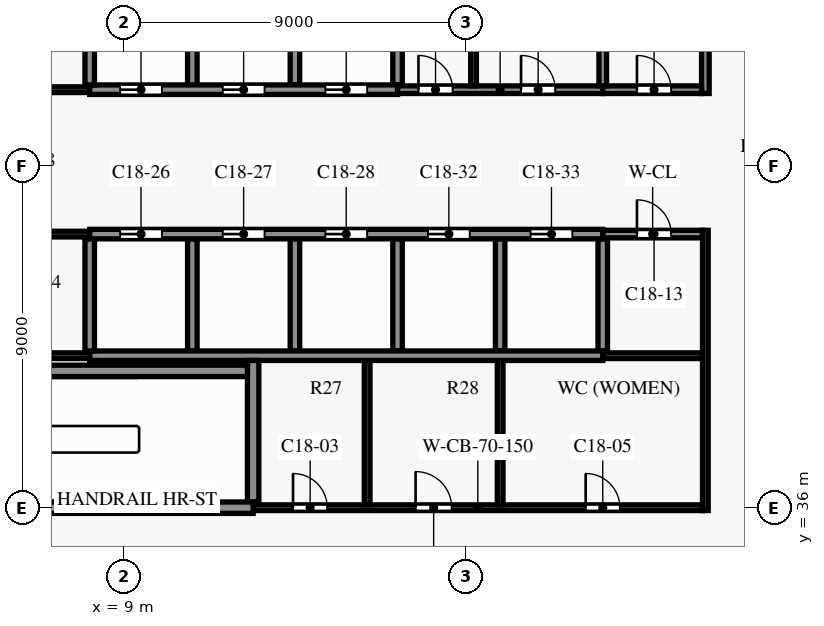
"""IFC4 building model, lengths in metres.
Left out: names, types, materials, properties, quantities, classifications, styles, units other than length and angle.
Written with IfcOpenShell. Run it as: python <this file> out.ifc"""

import sys

from ifc_helpers import new_model, si_unit, direction, frame, frame_2d, origin, place, context, subcontext, project, spatial, rectangle, extrude, element, fill, save


model = new_model("IFC4")
c1 = context("Model", 3, precision=1e-05, world=origin(), true_north=direction((0.0, 1.0)))
c2 = subcontext(c1, "Body", "Model", "MODEL_VIEW")
j1 = project(units=[si_unit("LENGTHUNIT", "METRE"), si_unit("PLANEANGLEUNIT", "RADIAN")], contexts=[c1])
p1 = place(None, origin())
s1 = spatial("IfcSite", under=j1, at=p1, CompositionType="ELEMENT")
p2 = place(p1, origin())
s2 = spatial("IfcBuilding", under=s1, at=p2, CompositionType="ELEMENT")
p3 = place(p2, frame((0.0, 0.0, 130.3)))
s3 = spatial("IfcBuildingStorey", under=s2, at=p3, CompositionType="ELEMENT", Elevation=130.3)
p4 = place(p3, frame((12.4, 36.0, 0.0), z_axis=(0.0, 0.0, 1.0), x_axis=(1.0, 0.0, 0.0)))
e1 = element("IfcWall", 1, at=p4, inside=s3, PredefinedType="SHEAR", context=c2, shape_type="SweptSolid", body=[
    extrude(rectangle(XDim=11.825, YDim=0.15, at=frame_2d((5.913, 0.0))), origin(), (0.0, 0.0, 1.0), 3.5),
])
p5 = place(p4, frame((1.05, 0.0, 0.0)))
e2 = element("IfcOpeningElement", 2, at=p5, cuts=e1, PredefinedType="OPENING", context=c2, shape_type="SweptSolid", body=[
    extrude(rectangle(XDim=0.9, YDim=2.1, at=frame_2d((0.45, 1.05))), frame((0.0, 0.085, 0.0), z_axis=(0.0, -1.0, 0.0), x_axis=(1.0, 0.0, 0.0)), (0.0, 0.0, 1.0), 0.17),
])
p6 = place(p4, frame((4.275, 0.0, 0.0)))
e3 = element("IfcOpeningElement", 3, at=p6, cuts=e1, PredefinedType="OPENING", context=c2, shape_type="SweptSolid", body=[
    extrude(rectangle(XDim=0.95, YDim=2.1, at=frame_2d((0.475, 1.05))), frame((0.0, 0.085, 0.0), z_axis=(0.0, -1.0, 0.0), x_axis=(1.0, 0.0, 0.0)), (0.0, 0.0, 1.0), 0.17),
])
p7 = place(p4, frame((8.75, 0.0, 0.0)))
e4 = element("IfcOpeningElement", 4, at=p7, cuts=e1, PredefinedType="OPENING", context=c2, shape_type="SweptSolid", body=[
    extrude(rectangle(XDim=0.9, YDim=2.1, at=frame_2d((0.45, 1.05))), frame((0.0, 0.085, 0.0), z_axis=(0.0, -1.0, 0.0), x_axis=(1.0, 0.0, 0.0)), (0.0, 0.0, 1.0), 0.17),
])
p8 = place(p3, frame((4.4, 36.0, 0.0), z_axis=(0.0, 0.0, 1.0), x_axis=(1.0, 0.0, 0.0)))
e5 = element("IfcWall", 5, at=p8, inside=s3, PredefinedType="SHEAR", context=c2, shape_type="SweptSolid", body=[
    extrude(rectangle(XDim=8.0, YDim=0.3, at=frame_2d((4.0, 0.0))), origin(), (0.0, 0.0, 1.0), 3.5),
])
p9 = place(p8, frame((0.3, 0.0, 0.0)))
e6 = element("IfcOpeningElement", 6, at=p9, cuts=e5, PredefinedType="OPENING", context=c2, shape_type="SweptSolid", body=[
    extrude(rectangle(XDim=1.5, YDim=2.2, at=frame_2d((0.75, 1.1))), frame((0.0, 0.16, 0.0), z_axis=(0.0, -1.0, 0.0), x_axis=(1.0, 0.0, 0.0)), (0.0, 0.0, 1.0), 0.32),
])
p10 = place(p3, frame((4.55, 39.6, 0.0), z_axis=(0.0, 0.0, 1.0), x_axis=(1.0, 0.0, 0.0)))
e7 = element("IfcWall", 7, at=p10, inside=s3, PredefinedType="SHEAR", context=c2, shape_type="SweptSolid", body=[
    extrude(rectangle(XDim=7.7, YDim=0.3, at=frame_2d((3.85, 0.0))), origin(), (0.0, 0.0, 1.0), 3.5),
])
p11 = place(p3, frame((4.4, 40.0, 0.0), z_axis=(0.0, 0.0, 1.0), x_axis=(1.0, 0.0, 0.0)))
e8 = element("IfcWall", 8, at=p11, inside=s3, PredefinedType="PARTITIONING", context=c2, shape_type="SweptSolid", body=[
    extrude(rectangle(XDim=3.7, YDim=0.15, at=frame_2d((1.85, 0.0))), origin(), (0.0, 0.0, 1.0), 3.5),
])
p12 = place(p3, frame((21.6, 40.0, 0.0), z_axis=(0.0, 0.0, 1.0), x_axis=(1.0, 0.0, 0.0)))
e9 = element("IfcWall", 9, at=p12, inside=s3, PredefinedType="PARTITIONING", context=c2, shape_type="SweptSolid", body=[
    extrude(rectangle(XDim=2.625, YDim=0.15, at=frame_2d((1.312, 0.0))), origin(), (0.0, 0.0, 1.0), 3.5),
])
p13 = place(p3, frame((8.1, 40.0, 0.0), z_axis=(0.0, 0.0, 1.0), x_axis=(1.0, 0.0, 0.0)))
e10 = element("IfcWall", 10, at=p13, inside=s3, PredefinedType="SHEAR", context=c2, shape_type="SweptSolid", body=[
    extrude(rectangle(XDim=13.5, YDim=0.25, at=frame_2d((6.75, 0.0))), origin(), (0.0, 0.0, 1.0), 3.5),
])
p14 = place(p3, frame((21.6, 43.2, 0.0), z_axis=(0.0, 0.0, 1.0), x_axis=(1.0, 0.0, 0.0)))
e11 = element("IfcWall", 11, at=p14, inside=s3, PredefinedType="PARTITIONING", context=c2, shape_type="SweptSolid", body=[
    extrude(rectangle(XDim=2.625, YDim=0.2, at=frame_2d((1.312, 0.0))), origin(), (0.0, 0.0, 1.0), 3.5),
])
p15 = place(p14, frame((0.9, 0.0, 0.0)))
e12 = element("IfcOpeningElement", 12, at=p15, cuts=e11, PredefinedType="OPENING", context=c2, shape_type="SweptSolid", body=[
    extrude(rectangle(XDim=0.9, YDim=2.1, at=frame_2d((0.45, 1.05))), frame((0.0, 0.11, 0.0), z_axis=(0.0, -1.0, 0.0), x_axis=(1.0, 0.0, 0.0)), (0.0, 0.0, 1.0), 0.22),
])
p16 = place(p3, frame((0.15, 43.2, 0.0), z_axis=(0.0, 0.0, 1.0), x_axis=(1.0, 0.0, 0.0)))
e13 = element("IfcWall", 13, at=p16, inside=s3, PredefinedType="PARTITIONING", context=c2, shape_type="SweptSolid", body=[
    extrude(rectangle(XDim=7.95, YDim=0.15, at=frame_2d((3.975, 0.0))), origin(), (0.0, 0.0, 1.0), 3.5),
])
p17 = place(p16, frame((0.725, 0.0, 0.0)))
e14 = element("IfcOpeningElement", 14, at=p17, cuts=e13, PredefinedType="OPENING", context=c2, shape_type="SweptSolid", body=[
    extrude(rectangle(XDim=0.9, YDim=2.1, at=frame_2d((0.45, 1.05))), frame((0.0, 0.085, 0.0), z_axis=(0.0, -1.0, 0.0), x_axis=(1.0, 0.0, 0.0)), (0.0, 0.0, 1.0), 0.17),
])
p18 = place(p16, frame((4.45, 0.0, 0.0)))
e15 = element("IfcOpeningElement", 15, at=p18, cuts=e13, PredefinedType="OPENING", context=c2, shape_type="SweptSolid", body=[
    extrude(rectangle(XDim=0.9, YDim=2.1, at=frame_2d((0.45, 1.05))), frame((0.0, 0.085, 0.0), z_axis=(0.0, -1.0, 0.0), x_axis=(1.0, 0.0, 0.0)), (0.0, 0.0, 1.0), 0.17),
])
p19 = place(p3, frame((8.1, 43.2, 0.0), z_axis=(0.0, 0.0, 1.0), x_axis=(1.0, 0.0, 0.0)))
e16 = element("IfcWall", 16, at=p19, inside=s3, PredefinedType="SHEAR", context=c2, shape_type="SweptSolid", body=[
    extrude(rectangle(XDim=13.5, YDim=0.25, at=frame_2d((6.75, 0.0))), origin(), (0.0, 0.0, 1.0), 3.5),
])
p20 = place(p19, frame((0.8, 0.0, 0.0)))
e17 = element("IfcOpeningElement", 17, at=p20, cuts=e16, PredefinedType="OPENING", context=c2, shape_type="SweptSolid", body=[
    extrude(rectangle(XDim=1.1, YDim=2.1, at=frame_2d((0.55, 1.05))), frame((0.0, 0.135, 0.0), z_axis=(0.0, -1.0, 0.0), x_axis=(1.0, 0.0, 0.0)), (0.0, 0.0, 1.0), 0.27),
])
p21 = place(p19, frame((3.5, 0.0, 0.0)))
e18 = element("IfcOpeningElement", 18, at=p21, cuts=e16, PredefinedType="OPENING", context=c2, shape_type="SweptSolid", body=[
    extrude(rectangle(XDim=1.1, YDim=2.1, at=frame_2d((0.55, 1.05))), frame((0.0, 0.135, 0.0), z_axis=(0.0, -1.0, 0.0), x_axis=(1.0, 0.0, 0.0)), (0.0, 0.0, 1.0), 0.27),
])
p22 = place(p19, frame((6.2, 0.0, 0.0)))
e19 = element("IfcOpeningElement", 19, at=p22, cuts=e16, PredefinedType="OPENING", context=c2, shape_type="SweptSolid", body=[
    extrude(rectangle(XDim=1.1, YDim=2.1, at=frame_2d((0.55, 1.05))), frame((0.0, 0.135, 0.0), z_axis=(0.0, -1.0, 0.0), x_axis=(1.0, 0.0, 0.0)), (0.0, 0.0, 1.0), 0.27),
])
p23 = place(p19, frame((8.9, 0.0, 0.0)))
e20 = element("IfcOpeningElement", 20, at=p23, cuts=e16, PredefinedType="OPENING", context=c2, shape_type="SweptSolid", body=[
    extrude(rectangle(XDim=1.1, YDim=2.1, at=frame_2d((0.55, 1.05))), frame((0.0, 0.135, 0.0), z_axis=(0.0, -1.0, 0.0), x_axis=(1.0, 0.0, 0.0)), (0.0, 0.0, 1.0), 0.27),
])
p24 = place(p19, frame((11.6, 0.0, 0.0)))
e21 = element("IfcOpeningElement", 21, at=p24, cuts=e16, PredefinedType="OPENING", context=c2, shape_type="SweptSolid", body=[
    extrude(rectangle(XDim=1.1, YDim=2.1, at=frame_2d((0.55, 1.05))), frame((0.0, 0.135, 0.0), z_axis=(0.0, -1.0, 0.0), x_axis=(1.0, 0.0, 0.0)), (0.0, 0.0, 1.0), 0.27),
])
p25 = place(p3, frame((16.2, 47.0, 0.0), z_axis=(0.0, 0.0, 1.0), x_axis=(1.0, 0.0, 0.0)))
e22 = element("IfcWall", 22, at=p25, inside=s3, PredefinedType="PARTITIONING", context=c2, shape_type="SweptSolid", body=[
    extrude(rectangle(XDim=5.4, YDim=0.2, at=frame_2d((2.7, 0.0))), origin(), (0.0, 0.0, 1.0), 3.5),
])
p26 = place(p25, frame((0.55, 0.0, 0.0)))
e23 = element("IfcOpeningElement", 23, at=p26, cuts=e22, PredefinedType="OPENING", context=c2, shape_type="SweptSolid", body=[
    extrude(rectangle(XDim=0.9, YDim=2.1, at=frame_2d((0.45, 1.05))), frame((0.0, 0.11, 0.0), z_axis=(0.0, -1.0, 0.0), x_axis=(1.0, 0.0, 0.0)), (0.0, 0.0, 1.0), 0.22),
])
p27 = place(p25, frame((3.25, 0.0, 0.0)))
e24 = element("IfcOpeningElement", 24, at=p27, cuts=e22, PredefinedType="OPENING", context=c2, shape_type="SweptSolid", body=[
    extrude(rectangle(XDim=0.9, YDim=2.1, at=frame_2d((0.45, 1.05))), frame((0.0, 0.11, 0.0), z_axis=(0.0, -1.0, 0.0), x_axis=(1.0, 0.0, 0.0)), (0.0, 0.0, 1.0), 0.22),
])
p28 = place(p3, frame((0.15, 47.0, 0.0), z_axis=(0.0, 0.0, 1.0), x_axis=(1.0, 0.0, 0.0)))
e25 = element("IfcWall", 25, at=p28, inside=s3, PredefinedType="PARTITIONING", context=c2, shape_type="SweptSolid", body=[
    extrude(rectangle(XDim=7.95, YDim=0.15, at=frame_2d((3.975, 0.0))), origin(), (0.0, 0.0, 1.0), 3.5),
])
p29 = place(p28, frame((0.725, 0.0, 0.0)))
e26 = element("IfcOpeningElement", 26, at=p29, cuts=e25, PredefinedType="OPENING", context=c2, shape_type="SweptSolid", body=[
    extrude(rectangle(XDim=0.9, YDim=2.1, at=frame_2d((0.45, 1.05))), frame((0.0, 0.085, 0.0), z_axis=(0.0, -1.0, 0.0), x_axis=(1.0, 0.0, 0.0)), (0.0, 0.0, 1.0), 0.17),
])
p30 = place(p28, frame((4.45, 0.0, 0.0)))
e27 = element("IfcOpeningElement", 27, at=p30, cuts=e25, PredefinedType="OPENING", context=c2, shape_type="SweptSolid", body=[
    extrude(rectangle(XDim=0.9, YDim=2.1, at=frame_2d((0.45, 1.05))), frame((0.0, 0.085, 0.0), z_axis=(0.0, -1.0, 0.0), x_axis=(1.0, 0.0, 0.0)), (0.0, 0.0, 1.0), 0.17),
])
p31 = place(p3, frame((21.6, 47.0, 0.0), z_axis=(0.0, 0.0, 1.0), x_axis=(1.0, 0.0, 0.0)))
e28 = element("IfcWall", 28, at=p31, inside=s3, PredefinedType="PARTITIONING", context=c2, shape_type="SweptSolid", body=[
    extrude(rectangle(XDim=2.6, YDim=0.2, at=frame_2d((1.3, 0.0))), origin(), (0.0, 0.0, 1.0), 3.5),
])
p32 = place(p31, frame((0.9, 0.0, 0.0)))
e29 = element("IfcOpeningElement", 29, at=p32, cuts=e28, PredefinedType="OPENING", context=c2, shape_type="SweptSolid", body=[
    extrude(rectangle(XDim=0.9, YDim=2.1, at=frame_2d((0.45, 1.05))), frame((0.0, 0.11, 0.0), z_axis=(0.0, -1.0, 0.0), x_axis=(1.0, 0.0, 0.0)), (0.0, 0.0, 1.0), 0.22),
])
p33 = place(p3, frame((8.1, 47.0, 0.0), z_axis=(0.0, 0.0, 1.0), x_axis=(1.0, 0.0, 0.0)))
e30 = element("IfcWall", 30, at=p33, inside=s3, PredefinedType="SHEAR", context=c2, shape_type="SweptSolid", body=[
    extrude(rectangle(XDim=8.1, YDim=0.25, at=frame_2d((4.05, 0.0))), origin(), (0.0, 0.0, 1.0), 3.5),
])
p34 = place(p33, frame((0.8, 0.0, 0.0)))
e31 = element("IfcOpeningElement", 31, at=p34, cuts=e30, PredefinedType="OPENING", context=c2, shape_type="SweptSolid", body=[
    extrude(rectangle(XDim=1.1, YDim=2.1, at=frame_2d((0.55, 1.05))), frame((0.0, 0.135, 0.0), z_axis=(0.0, -1.0, 0.0), x_axis=(1.0, 0.0, 0.0)), (0.0, 0.0, 1.0), 0.27),
])
p35 = place(p33, frame((3.5, 0.0, 0.0)))
e32 = element("IfcOpeningElement", 32, at=p35, cuts=e30, PredefinedType="OPENING", context=c2, shape_type="SweptSolid", body=[
    extrude(rectangle(XDim=1.1, YDim=2.1, at=frame_2d((0.55, 1.05))), frame((0.0, 0.135, 0.0), z_axis=(0.0, -1.0, 0.0), x_axis=(1.0, 0.0, 0.0)), (0.0, 0.0, 1.0), 0.27),
])
p36 = place(p33, frame((6.2, 0.0, 0.0)))
e33 = element("IfcOpeningElement", 33, at=p36, cuts=e30, PredefinedType="OPENING", context=c2, shape_type="SweptSolid", body=[
    extrude(rectangle(XDim=1.1, YDim=2.1, at=frame_2d((0.55, 1.05))), frame((0.0, 0.135, 0.0), z_axis=(0.0, -1.0, 0.0), x_axis=(1.0, 0.0, 0.0)), (0.0, 0.0, 1.0), 0.27),
])
for number, where, z_axis, x_axis in (
    (34, (8.1, 40.125, 0.0), (0.0, 0.0, 1.0), (0.0, 1.0, 0.0)),
    (35, (8.1, 47.125, 0.0), (0.0, 0.0, 1.0), (0.0, 1.0, 0.0)),
    (36, (10.8, 40.125, 0.0), (0.0, 0.0, 1.0), (0.0, 1.0, 0.0)),
    (37, (10.8, 47.125, 0.0), (0.0, 0.0, 1.0), (0.0, 1.0, 0.0)),
):
    element("IfcWall", number, at=place(p3, frame(where, z_axis=z_axis, x_axis=x_axis)), inside=s3, PredefinedType="SHEAR", context=c2, shape_type="SweptSolid", body=[
        extrude(rectangle(XDim=2.95, YDim=0.25, at=frame_2d((1.475, 0.0))), origin(), (0.0, 0.0, 1.0), 3.5),
    ])
p37 = place(p3, frame((12.4, 36.15, 0.0), z_axis=(0.0, 0.0, 1.0), x_axis=(0.0, 1.0, 0.0)))
e38 = element("IfcWall", 38, at=p37, inside=s3, PredefinedType="SHEAR", context=c2, shape_type="SweptSolid", body=[
    extrude(rectangle(XDim=3.725, YDim=0.3, at=frame_2d((1.863, 0.0))), origin(), (0.0, 0.0, 1.0), 3.5),
])
for number, where, z_axis, x_axis in (
    (39, (13.5, 40.125, 0.0), (0.0, 0.0, 1.0), (0.0, 1.0, 0.0)),
    (40, (13.5, 47.125, 0.0), (0.0, 0.0, 1.0), (0.0, 1.0, 0.0)),
):
    element("IfcWall", number, at=place(p3, frame(where, z_axis=z_axis, x_axis=x_axis)), inside=s3, PredefinedType="SHEAR", context=c2, shape_type="SweptSolid", body=[
        extrude(rectangle(XDim=2.95, YDim=0.25, at=frame_2d((1.475, 0.0))), origin(), (0.0, 0.0, 1.0), 3.5),
    ])
p38 = place(p3, frame((15.4, 36.075, 0.0), z_axis=(0.0, 0.0, 1.0), x_axis=(0.0, 1.0, 0.0)))
e41 = element("IfcWall", 41, at=p38, inside=s3, PredefinedType="PARTITIONING", context=c2, shape_type="SweptSolid", body=[
    extrude(rectangle(XDim=3.8, YDim=0.15, at=frame_2d((1.9, 0.0))), origin(), (0.0, 0.0, 1.0), 3.5),
])
p39 = place(p3, frame((16.2, 40.125, 0.0), z_axis=(0.0, 0.0, 1.0), x_axis=(0.0, 1.0, 0.0)))
e42 = element("IfcWall", 42, at=p39, inside=s3, PredefinedType="SHEAR", context=c2, shape_type="SweptSolid", body=[
    extrude(rectangle(XDim=2.95, YDim=0.25, at=frame_2d((1.475, 0.0))), origin(), (0.0, 0.0, 1.0), 3.5),
])
p40 = place(p3, frame((16.2, 47.125, 0.0), z_axis=(0.0, 0.0, 1.0), x_axis=(0.0, 1.0, 0.0)))
e43 = element("IfcWall", 43, at=p40, inside=s3, PredefinedType="SHEAR", context=c2, shape_type="SweptSolid", body=[
    extrude(rectangle(XDim=3.075, YDim=0.25, at=frame_2d((1.538, 0.0))), origin(), (0.0, 0.0, 1.0), 3.5),
])
p41 = place(p3, frame((18.2, 47.1, 0.0), z_axis=(0.0, 0.0, 1.0), x_axis=(0.0, 1.0, 0.0)))
e44 = element("IfcWall", 44, at=p41, inside=s3, PredefinedType="PARTITIONING", context=c2, shape_type="SweptSolid", body=[
    extrude(rectangle(XDim=4.625, YDim=0.15, at=frame_2d((2.312, 0.0))), origin(), (0.0, 0.0, 1.0), 3.5),
])
p42 = place(p3, frame((18.9, 36.075, 0.0), z_axis=(0.0, 0.0, 1.0), x_axis=(0.0, 1.0, 0.0)))
e45 = element("IfcWall", 45, at=p42, inside=s3, PredefinedType="PARTITIONING", context=c2, shape_type="SweptSolid", body=[
    extrude(rectangle(XDim=3.8, YDim=0.15, at=frame_2d((1.9, 0.0))), origin(), (0.0, 0.0, 1.0), 3.5),
])
p43 = place(p3, frame((18.9, 40.125, 0.0), z_axis=(0.0, 0.0, 1.0), x_axis=(0.0, 1.0, 0.0)))
e46 = element("IfcWall", 46, at=p43, inside=s3, PredefinedType="SHEAR", context=c2, shape_type="SweptSolid", body=[
    extrude(rectangle(XDim=2.95, YDim=0.25, at=frame_2d((1.475, 0.0))), origin(), (0.0, 0.0, 1.0), 3.5),
])
p44 = place(p3, frame((21.6, 47.1, 0.0), z_axis=(0.0, 0.0, 1.0), x_axis=(0.0, 1.0, 0.0)))
e47 = element("IfcWall", 47, at=p44, inside=s3, PredefinedType="PARTITIONING", context=c2, shape_type="SweptSolid", body=[
    extrude(rectangle(XDim=4.6, YDim=0.2, at=frame_2d((2.3, 0.0))), origin(), (0.0, 0.0, 1.0), 3.5),
])
p45 = place(p3, frame((21.6, 40.125, 0.0), z_axis=(0.0, 0.0, 1.0), x_axis=(0.0, 1.0, 0.0)))
e48 = element("IfcWall", 48, at=p45, inside=s3, PredefinedType="SHEAR", context=c2, shape_type="SweptSolid", body=[
    extrude(rectangle(XDim=2.95, YDim=0.25, at=frame_2d((1.475, 0.0))), origin(), (0.0, 0.0, 1.0), 3.5),
])
p46 = place(p3, frame((24.3, 35.925, 0.0), z_axis=(0.0, 0.0, 1.0), x_axis=(0.0, 1.0, 0.0)))
e49 = element("IfcWall", 49, at=p46, inside=s3, PredefinedType="PARTITIONING", context=c2, shape_type="SweptSolid", body=[
    extrude(rectangle(XDim=7.375, YDim=0.15, at=frame_2d((3.688, 0.0))), origin(), (0.0, 0.0, 1.0), 3.5),
])
p47 = place(p3, frame((24.3, 46.9, 0.0), z_axis=(0.0, 0.0, 1.0), x_axis=(0.0, 1.0, 0.0)))
e50 = element("IfcWall", 50, at=p47, inside=s3, PredefinedType="SHEAR", context=c2, shape_type="SweptSolid", body=[
    extrude(rectangle(XDim=5.0, YDim=0.2, at=frame_2d((2.5, 0.0))), origin(), (0.0, 0.0, 1.0), 3.5),
])
p48 = place(p32, origin())
e51 = element("IfcDoor", 51, at=p48, inside=s3, OperationType="SINGLE_SWING_LEFT", PredefinedType="DOOR", context=c2, shape_type="SweptSolid", body=[
    extrude(rectangle(XDim=0.9, YDim=2.1, at=frame_2d((0.45, 1.05))), frame((0.0, 0.025, 0.0), z_axis=(0.0, -1.0, 0.0), x_axis=(1.0, 0.0, 0.0)), (0.0, 0.0, 1.0), 0.05),
])
fill(e29, e51)
p49 = place(p5, origin())
e52 = element("IfcDoor", 52, at=p49, inside=s3, OperationType="SINGLE_SWING_RIGHT", PredefinedType="DOOR", context=c2, shape_type="SweptSolid", body=[
    extrude(rectangle(XDim=0.9, YDim=2.1, at=frame_2d((0.45, 1.05))), frame((0.0, 0.025, 0.0), z_axis=(0.0, -1.0, 0.0), x_axis=(1.0, 0.0, 0.0)), (0.0, 0.0, 1.0), 0.05),
])
fill(e2, e52)
p50 = place(p6, origin())
e53 = element("IfcDoor", 53, at=p50, inside=s3, OperationType="SINGLE_SWING_LEFT", PredefinedType="DOOR", context=c2, shape_type="SweptSolid", body=[
    extrude(rectangle(XDim=0.95, YDim=2.1, at=frame_2d((0.475, 1.05))), frame((0.0, 0.025, 0.0), z_axis=(0.0, -1.0, 0.0), x_axis=(1.0, 0.0, 0.0)), (0.0, 0.0, 1.0), 0.05),
])
fill(e3, e53)
p51 = place(p7, origin())
e54 = element("IfcDoor", 54, at=p51, inside=s3, OperationType="SINGLE_SWING_RIGHT", PredefinedType="DOOR", context=c2, shape_type="SweptSolid", body=[
    extrude(rectangle(XDim=0.9, YDim=2.1, at=frame_2d((0.45, 1.05))), frame((0.0, 0.025, 0.0), z_axis=(0.0, -1.0, 0.0), x_axis=(1.0, 0.0, 0.0)), (0.0, 0.0, 1.0), 0.05),
])
fill(e4, e54)
p52 = place(p26, origin())
e55 = element("IfcDoor", 55, at=p52, inside=s3, OperationType="SINGLE_SWING_LEFT", PredefinedType="DOOR", context=c2, shape_type="SweptSolid", body=[
    extrude(rectangle(XDim=0.9, YDim=2.1, at=frame_2d((0.45, 1.05))), frame((0.0, 0.025, 0.0), z_axis=(0.0, -1.0, 0.0), x_axis=(1.0, 0.0, 0.0)), (0.0, 0.0, 1.0), 0.05),
])
fill(e23, e55)
p53 = place(p27, origin())
e56 = element("IfcDoor", 56, at=p53, inside=s3, OperationType="SINGLE_SWING_RIGHT", PredefinedType="DOOR", context=c2, shape_type="SweptSolid", body=[
    extrude(rectangle(XDim=0.9, YDim=2.1, at=frame_2d((0.45, 1.05))), frame((0.0, 0.025, 0.0), z_axis=(0.0, -1.0, 0.0), x_axis=(1.0, 0.0, 0.0)), (0.0, 0.0, 1.0), 0.05),
])
fill(e24, e56)
p54 = place(p15, origin())
e57 = element("IfcDoor", 57, at=p54, inside=s3, OperationType="SINGLE_SWING_RIGHT", PredefinedType="DOOR", context=c2, shape_type="SweptSolid", body=[
    extrude(rectangle(XDim=0.9, YDim=2.1, at=frame_2d((0.45, 1.05))), frame((0.0, 0.025, 0.0), z_axis=(0.0, -1.0, 0.0), x_axis=(1.0, 0.0, 0.0)), (0.0, 0.0, 1.0), 0.05),
])
fill(e12, e57)
p55 = place(p20, origin())
e58 = element("IfcDoor", 58, at=p55, inside=s3, OperationType="DOUBLE_DOOR_SLIDING", PredefinedType="DOOR", context=c2, shape_type="SweptSolid", body=[
    extrude(rectangle(XDim=1.1, YDim=2.1, at=frame_2d((0.55, 1.05))), frame((0.0, 0.025, 0.0), z_axis=(0.0, -1.0, 0.0), x_axis=(1.0, 0.0, 0.0)), (0.0, 0.0, 1.0), 0.05),
])
fill(e17, e58)
p56 = place(p21, origin())
e59 = element("IfcDoor", 59, at=p56, inside=s3, OperationType="DOUBLE_DOOR_SLIDING", PredefinedType="DOOR", context=c2, shape_type="SweptSolid", body=[
    extrude(rectangle(XDim=1.1, YDim=2.1, at=frame_2d((0.55, 1.05))), frame((0.0, 0.025, 0.0), z_axis=(0.0, -1.0, 0.0), x_axis=(1.0, 0.0, 0.0)), (0.0, 0.0, 1.0), 0.05),
])
fill(e18, e59)
p57 = place(p22, origin())
e60 = element("IfcDoor", 60, at=p57, inside=s3, OperationType="DOUBLE_DOOR_SLIDING", PredefinedType="DOOR", context=c2, shape_type="SweptSolid", body=[
    extrude(rectangle(XDim=1.1, YDim=2.1, at=frame_2d((0.55, 1.05))), frame((0.0, 0.025, 0.0), z_axis=(0.0, -1.0, 0.0), x_axis=(1.0, 0.0, 0.0)), (0.0, 0.0, 1.0), 0.05),
])
fill(e19, e60)
p58 = place(p34, origin())
e61 = element("IfcDoor", 61, at=p58, inside=s3, OperationType="DOUBLE_DOOR_SLIDING", PredefinedType="DOOR", context=c2, shape_type="SweptSolid", body=[
    extrude(rectangle(XDim=1.1, YDim=2.1, at=frame_2d((0.55, 1.05))), frame((0.0, 0.025, 0.0), z_axis=(0.0, -1.0, 0.0), x_axis=(1.0, 0.0, 0.0)), (0.0, 0.0, 1.0), 0.05),
])
fill(e31, e61)
p59 = place(p35, origin())
e62 = element("IfcDoor", 62, at=p59, inside=s3, OperationType="DOUBLE_DOOR_SLIDING", PredefinedType="DOOR", context=c2, shape_type="SweptSolid", body=[
    extrude(rectangle(XDim=1.1, YDim=2.1, at=frame_2d((0.55, 1.05))), frame((0.0, 0.025, 0.0), z_axis=(0.0, -1.0, 0.0), x_axis=(1.0, 0.0, 0.0)), (0.0, 0.0, 1.0), 0.05),
])
fill(e32, e62)
p60 = place(p36, origin())
e63 = element("IfcDoor", 63, at=p60, inside=s3, OperationType="DOUBLE_DOOR_SLIDING", PredefinedType="DOOR", context=c2, shape_type="SweptSolid", body=[
    extrude(rectangle(XDim=1.1, YDim=2.1, at=frame_2d((0.55, 1.05))), frame((0.0, 0.025, 0.0), z_axis=(0.0, -1.0, 0.0), x_axis=(1.0, 0.0, 0.0)), (0.0, 0.0, 1.0), 0.05),
])
fill(e33, e63)
p61 = place(p23, origin())
e64 = element("IfcDoor", 64, at=p61, inside=s3, OperationType="DOUBLE_DOOR_SLIDING", PredefinedType="DOOR", context=c2, shape_type="SweptSolid", body=[
    extrude(rectangle(XDim=1.1, YDim=2.1, at=frame_2d((0.55, 1.05))), frame((0.0, 0.025, 0.0), z_axis=(0.0, -1.0, 0.0), x_axis=(1.0, 0.0, 0.0)), (0.0, 0.0, 1.0), 0.05),
])
fill(e20, e64)
p62 = place(p24, origin())
e65 = element("IfcDoor", 65, at=p62, inside=s3, OperationType="DOUBLE_DOOR_SLIDING", PredefinedType="DOOR", context=c2, shape_type="SweptSolid", body=[
    extrude(rectangle(XDim=1.1, YDim=2.1, at=frame_2d((0.55, 1.05))), frame((0.0, 0.025, 0.0), z_axis=(0.0, -1.0, 0.0), x_axis=(1.0, 0.0, 0.0)), (0.0, 0.0, 1.0), 0.05),
])
fill(e21, e65)
save(model, sys.argv[1])
